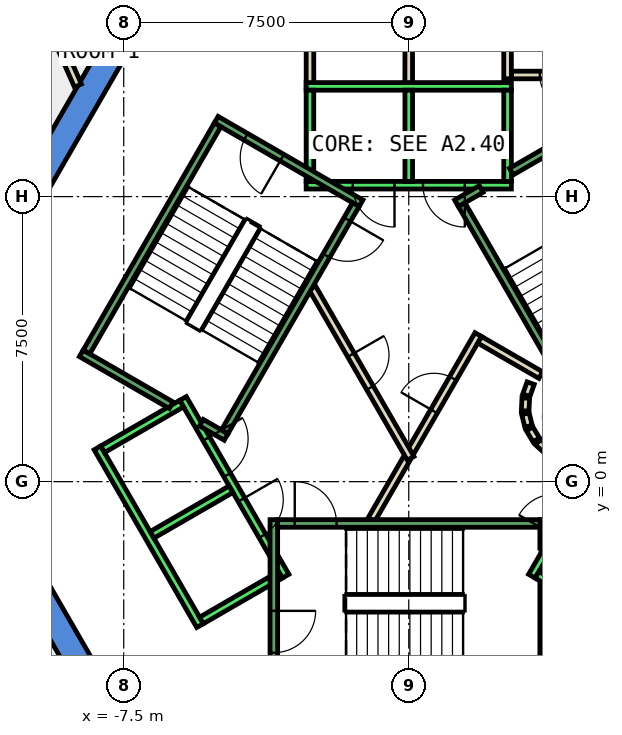
"""IFC4 building model, lengths in metres.
Left out: names, types, materials, properties, quantities, classifications, styles, units other than length and angle.
Written with IfcOpenShell. Run it as: python <this file> out.ifc"""

import sys

from ifc_helpers import new_model, si_unit, direction, frame, frame_2d, origin, place, context, subcontext, project, spatial, polyline, rectangle, outline, extrude, element, fill, save


model = new_model("IFC4")
c1 = context("Model", 3, precision=1e-05, world=origin(), true_north=direction((0.0, 1.0)))
c2 = subcontext(c1, "Body", "Model", "MODEL_VIEW")
j1 = project(units=[si_unit("LENGTHUNIT", "METRE"), si_unit("PLANEANGLEUNIT", "RADIAN")], contexts=[c1])
p1 = place(None, origin())
s1 = spatial("IfcSite", under=j1, at=p1, CompositionType="ELEMENT")
p2 = place(p1, origin())
s2 = spatial("IfcBuilding", under=s1, at=p2, CompositionType="ELEMENT")
p3 = place(p2, frame((0.0, 0.0, 194.0)))
s3 = spatial("IfcBuildingStorey", under=s2, at=p3, CompositionType="ELEMENT", Elevation=194.0)
p4 = place(p3, frame((0.0, 0.0, -0.4)))
e1 = element("IfcWall", 1, at=p4, inside=s3, PredefinedType="SHEAR", context=c2, shape_type="SweptSolid", body=[
    extrude(outline(polyline([(-11.834, 5.002), (-11.228, 4.652), (-6.235, 13.3), (-6.64, 14.0), (-11.834, 5.002)])), origin(), (0.0, 0.0, 1.0), 4.2),
])
p5 = place(p3, frame((0.0, 0.0, -0.4)))
e2 = element("IfcWall", 2, at=p5, inside=s3, PredefinedType="SHEAR", context=c2, shape_type="SweptSolid", body=[
    extrude(outline(polyline([(-13.279, 2.5), (-6.64, -9.0), (-6.235, -8.3), (-12.471, 2.5), (-13.279, 2.5)])), origin(), (0.0, 0.0, 1.0), 4.2),
])
p6 = place(p3, frame((-9.315, 11.801, 0.0), z_axis=(0.0, 0.0, 1.0), x_axis=(0.403943240321, -0.914784050254, 0.0)))
e3 = element("IfcWall", 3, at=p6, inside=s3, PredefinedType="PARTITIONING", context=c2, shape_type="SweptSolid", body=[
    extrude(rectangle(XDim=1.507, YDim=0.2, at=frame_2d((0.754, 0.0))), origin(), (0.0, 0.0, 1.0), 3.8),
])
p7 = place(p3, frame((5.1, 10.7, 0.0), z_axis=(0.0, 0.0, 1.0), x_axis=(-1.0, 0.0, 0.0)))
e4 = element("IfcWall", 4, at=p7, inside=s3, PredefinedType="PARTITIONING", context=c2, shape_type="SweptSolid", body=[
    extrude(rectangle(XDim=2.4, YDim=0.2, at=frame_2d((1.2, 0.0))), origin(), (0.0, 0.0, 1.0), 3.8),
])
p8 = place(p7, frame((0.75, 0.0, 0.0)))
e5 = element("IfcOpeningElement", 5, at=p8, cuts=e4, PredefinedType="OPENING", context=c2, shape_type="SweptSolid", body=[
    extrude(rectangle(XDim=0.9, YDim=2.1, at=frame_2d((0.45, 1.05))), frame((0.0, 0.11, 0.0), z_axis=(0.0, -1.0, 0.0), x_axis=(1.0, 0.0, 0.0)), (0.0, 0.0, 1.0), 0.22),
])
p9 = place(p3, frame((2.6, 10.6, 0.0), z_axis=(0.0, 0.0, 1.0), x_axis=(0.0, 1.0, 0.0)))
e6 = element("IfcWall", 6, at=p9, inside=s3, PredefinedType="PARTITIONING", context=c2, shape_type="SweptSolid", body=[
    extrude(rectangle(XDim=2.7, YDim=0.2, at=frame_2d((1.35, 0.0))), origin(), (0.0, 0.0, 1.0), 3.8),
])
p10 = place(p3, frame((-2.599, 10.399, 0.0), z_axis=(0.0, 0.0, 1.0), x_axis=(-0.000336615314, 0.999999943345, 0.0)))
e7 = element("IfcWall", 7, at=p10, inside=s3, PredefinedType="PARTITIONING", context=c2, shape_type="SweptSolid", body=[
    extrude(rectangle(XDim=2.901, YDim=0.2, at=frame_2d((1.451, 0.0))), origin(), (0.0, 0.0, 1.0), 3.8),
])
p11 = place(p3, frame((0.0, 13.3, 0.0), z_axis=(0.0, 0.0, 1.0), x_axis=(-0.000336728662, -0.999999943307, 0.0)))
e8 = element("IfcWall", 8, at=p11, inside=s3, PredefinedType="PARTITIONING", context=c2, shape_type="SweptSolid", body=[
    extrude(rectangle(XDim=2.9, YDim=0.2, at=frame_2d((1.45, 0.0))), origin(), (0.0, 0.0, 1.0), 3.8),
])
p12 = place(p11, frame((0.85, 0.0, 0.0)))
e9 = element("IfcOpeningElement", 9, at=p12, cuts=e8, PredefinedType="OPENING", context=c2, shape_type="SweptSolid", body=[
    extrude(rectangle(XDim=0.9, YDim=2.1, at=frame_2d((0.45, 1.05))), frame((0.0, 0.11, 0.0), z_axis=(0.0, -1.0, 0.0), x_axis=(1.0, 0.0, 0.0)), (0.0, 0.0, 1.0), 0.22),
])
p13 = place(p3, frame((-0.982, -1.0, 0.0), z_axis=(0.0, 0.0, 1.0), x_axis=(0.50024047865, 0.865886518847, 0.0)))
e10 = element("IfcWall", 10, at=p13, inside=s3, PredefinedType="PARTITIONING", context=c2, shape_type="SweptSolid", body=[
    extrude(rectangle(XDim=1.863, YDim=0.2, at=frame_2d((0.931, 0.0))), origin(), (0.0, 0.0, 1.0), 3.8),
])
p14 = place(p3, frame((0.05, 0.787, 0.0), z_axis=(0.0, 0.0, 1.0), x_axis=(0.499954076797, 0.866051915934, 0.0)))
e11 = element("IfcWall", 11, at=p14, inside=s3, PredefinedType="PARTITIONING", context=c2, shape_type="SweptSolid", body=[
    extrude(rectangle(XDim=3.558, YDim=0.2, at=frame_2d((1.779, 0.0))), origin(), (0.0, 0.0, 1.0), 3.8),
])
p15 = place(p14, frame((1.229, 0.0, 0.0)))
e12 = element("IfcOpeningElement", 12, at=p15, cuts=e11, PredefinedType="OPENING", context=c2, shape_type="SweptSolid", body=[
    extrude(rectangle(XDim=1.0, YDim=2.1, at=frame_2d((0.5, 1.05))), frame((0.0, 0.11, 0.0), z_axis=(0.0, -1.0, 0.0), x_axis=(1.0, 0.0, 0.0)), (0.0, 0.0, 1.0), 0.22),
])
p16 = place(p3, frame((1.866, 3.732, 0.0), z_axis=(0.0, 0.0, 1.0), x_axis=(0.866043361281, -0.499968895414, 0.0)))
e13 = element("IfcWall", 13, at=p16, inside=s3, PredefinedType="PARTITIONING", context=c2, shape_type="SweptSolid", body=[
    extrude(rectangle(XDim=1.858, YDim=0.2, at=frame_2d((0.929, 0.0))), origin(), (0.0, 0.0, 1.0), 3.8),
])
p17 = place(p3, frame((3.208, 2.592, 0.0), z_axis=(0.0, 0.0, 1.0), x_axis=(-0.337388820924, -0.941365382578, 0.0)))
e14 = element("IfcWall", 14, at=p17, inside=s3, PredefinedType="PARTITIONING", context=c2, shape_type="SweptSolid", body=[
    extrude(rectangle(XDim=0.338, YDim=0.2, at=frame_2d((0.169, 0.0))), origin(), (0.0, 0.0, 1.0), 3.8),
])
p18 = place(p3, frame((3.079, 2.199, 0.0), z_axis=(0.0, 0.0, 1.0), x_axis=(-0.047771483479, -0.998858290933, 0.0)))
e15 = element("IfcWall", 15, at=p18, inside=s3, PredefinedType="PARTITIONING", context=c2, shape_type="SweptSolid", body=[
    extrude(rectangle(XDim=0.337, YDim=0.2, at=frame_2d((0.169, 0.0))), origin(), (0.0, 0.0, 1.0), 3.8),
])
p19 = place(p3, frame((3.07, 1.786, 0.0), z_axis=(0.0, 0.0, 1.0), x_axis=(0.242705583207, -0.970099994784, 0.0)))
e16 = element("IfcWall", 16, at=p19, inside=s3, PredefinedType="PARTITIONING", context=c2, shape_type="SweptSolid", body=[
    extrude(rectangle(XDim=0.338, YDim=0.2, at=frame_2d((0.169, 0.0))), origin(), (0.0, 0.0, 1.0), 3.8),
])
for number, where, z_axis, x_axis in (
    (17, (3.182, 1.388, 0.0), (0.0, 0.0, 1.0), (0.512, -0.859, 0.0)),
    (18, (3.404, 1.039, 0.0), (0.0, 0.0, 1.0), (0.74, -0.672, 0.0)),
):
    element("IfcWall", number, at=place(p3, frame(where, z_axis=z_axis, x_axis=x_axis)), inside=s3, PredefinedType="PARTITIONING", context=c2, shape_type="SweptSolid", body=[
        extrude(rectangle(XDim=0.338, YDim=0.2, at=frame_2d((0.169, 0.0))), origin(), (0.0, 0.0, 1.0), 3.8),
    ])
p20 = place(p3, frame((-2.54, 5.1, 0.0), z_axis=(0.0, 0.0, 1.0), x_axis=(0.499925051871, -0.866068670783, 0.0)))
e19 = element("IfcWall", 19, at=p20, inside=s3, PredefinedType="PARTITIONING", context=c2, shape_type="SweptSolid", body=[
    extrude(rectangle(XDim=5.181, YDim=0.2, at=frame_2d((2.59, 0.0))), origin(), (0.0, 0.0, 1.0), 3.8),
])
p21 = place(p20, frame((2.04, 0.0, 0.0)))
e20 = element("IfcOpeningElement", 20, at=p21, cuts=e19, PredefinedType="OPENING", context=c2, shape_type="SweptSolid", body=[
    extrude(rectangle(XDim=1.0, YDim=2.1, at=frame_2d((0.5, 1.05))), frame((0.0, 0.11, 0.0), z_axis=(0.0, -1.0, 0.0), x_axis=(1.0, 0.0, 0.0)), (0.0, 0.0, 1.0), 0.22),
])
p22 = place(p3, frame((2.7, 7.8, 0.0), z_axis=(0.0, 0.0, 1.0), x_axis=(-1.0, 0.0, 0.0)))
e21 = element("IfcWall", 21, at=p22, inside=s3, PredefinedType="STANDARD", context=c2, shape_type="SweptSolid", body=[
    extrude(rectangle(XDim=5.4, YDim=0.2, at=frame_2d((2.7, 0.0))), origin(), (0.0, 0.0, 1.0), 3.8),
])
p23 = place(p22, frame((1.225, 0.0, 0.0)))
e22 = element("IfcOpeningElement", 22, at=p23, cuts=e21, PredefinedType="OPENING", context=c2, shape_type="SweptSolid", body=[
    extrude(rectangle(XDim=1.1, YDim=2.1, at=frame_2d((0.55, 1.05))), frame((0.0, 0.11, 0.0), z_axis=(0.0, -1.0, 0.0), x_axis=(1.0, 0.0, 0.0)), (0.0, 0.0, 1.0), 0.22),
])
p24 = place(p22, frame((3.075, 0.0, 0.0)))
e23 = element("IfcOpeningElement", 23, at=p24, cuts=e21, PredefinedType="OPENING", context=c2, shape_type="SweptSolid", body=[
    extrude(rectangle(XDim=1.1, YDim=2.1, at=frame_2d((0.55, 1.05))), frame((0.0, 0.11, 0.0), z_axis=(0.0, -1.0, 0.0), x_axis=(1.0, 0.0, 0.0)), (0.0, 0.0, 1.0), 0.22),
])
p25 = place(p3, frame((2.7, 10.4, 0.0), z_axis=(0.0, 0.0, 1.0), x_axis=(-1.0, 0.0, 0.0)))
e24 = element("IfcWall", 24, at=p25, inside=s3, PredefinedType="STANDARD", context=c2, shape_type="SweptSolid", body=[
    extrude(rectangle(XDim=5.4, YDim=0.2, at=frame_2d((2.7, 0.0))), origin(), (0.0, 0.0, 1.0), 3.8),
])
for number, where, z_axis, x_axis in (
    (25, (2.6, 7.9, 0.0), (0.0, 0.0, 1.0), (0.0, 1.0, 0.0)),
    (26, (0.0, 7.9, 0.0), (0.0, 0.0, 1.0), (0.0, 1.0, 0.0)),
    (27, (-2.6, 7.9, 0.0), (0.0, 0.0, 1.0), (0.0, 1.0, 0.0)),
):
    element("IfcWall", number, at=place(p3, frame(where, z_axis=z_axis, x_axis=x_axis)), inside=s3, PredefinedType="STANDARD", context=c2, shape_type="SweptSolid", body=[
        extrude(rectangle(XDim=2.4, YDim=0.2, at=frame_2d((1.2, 0.0))), origin(), (0.0, 0.0, 1.0), 3.8),
    ])
p26 = place(p3, frame((-5.94, 2.188, 0.0), z_axis=(0.0, 0.0, 1.0), x_axis=(0.500034260056, -0.866005622828, 0.0)))
e28 = element("IfcWall", 28, at=p26, inside=s3, PredefinedType="STANDARD", context=c2, shape_type="SweptSolid", body=[
    extrude(rectangle(XDim=5.399, YDim=0.2, at=frame_2d((2.7, 0.0))), origin(), (0.0, 0.0, 1.0), 3.8),
])
p27 = place(p26, frame((3.075, 0.0, 0.0)))
e29 = element("IfcOpeningElement", 29, at=p27, cuts=e28, PredefinedType="OPENING", context=c2, shape_type="SweptSolid", body=[
    extrude(rectangle(XDim=1.1, YDim=2.1, at=frame_2d((0.55, 1.05))), frame((0.0, 0.11, 0.0), z_axis=(0.0, -1.0, 0.0), x_axis=(1.0, 0.0, 0.0)), (0.0, 0.0, 1.0), 0.22),
])
p28 = place(p26, frame((1.225, 0.0, 0.0)))
e30 = element("IfcOpeningElement", 30, at=p28, cuts=e28, PredefinedType="OPENING", context=c2, shape_type="SweptSolid", body=[
    extrude(rectangle(XDim=1.1, YDim=2.1, at=frame_2d((0.55, 1.05))), frame((0.0, 0.11, 0.0), z_axis=(0.0, -1.0, 0.0), x_axis=(1.0, 0.0, 0.0)), (0.0, 0.0, 1.0), 0.22),
])
p29 = place(p3, frame((-8.192, 0.888, 0.0), z_axis=(0.0, 0.0, 1.0), x_axis=(0.500034260056, -0.866005622828, 0.0)))
e31 = element("IfcWall", 31, at=p29, inside=s3, PredefinedType="STANDARD", context=c2, shape_type="SweptSolid", body=[
    extrude(rectangle(XDim=5.399, YDim=0.2, at=frame_2d((2.7, 0.0))), origin(), (0.0, 0.0, 1.0), 3.8),
])
for number, where, z_axis, x_axis in (
    (32, (-5.977, 2.052, 0.0), (0.0, 0.0, 1.0), (-0.866, -0.5, 0.0)),
    (33, (-4.677, -0.2, 0.0), (0.0, 0.0, 1.0), (-0.866, -0.5, 0.0)),
):
    element("IfcWall", number, at=place(p3, frame(where, z_axis=z_axis, x_axis=x_axis)), inside=s3, PredefinedType="STANDARD", context=c2, shape_type="SweptSolid", body=[
        extrude(rectangle(XDim=2.399, YDim=0.2, at=frame_2d((1.2, 0.0))), origin(), (0.0, 0.0, 1.0), 3.8),
    ])
p30 = place(p3, frame((-3.377, -2.452, 0.0), z_axis=(0.0, 0.0, 1.0), x_axis=(-0.865955154139, -0.50012165622, 0.0)))
e34 = element("IfcWall", 34, at=p30, inside=s3, PredefinedType="STANDARD", context=c2, shape_type="SweptSolid", body=[
    extrude(rectangle(XDim=2.4, YDim=0.2, at=frame_2d((1.2, 0.0))), origin(), (0.0, 0.0, 1.0), 3.8),
])
p31 = place(p3, frame((3.24, -2.488, 0.0), z_axis=(0.0, 0.0, 1.0), x_axis=(0.500034260056, 0.866005622828, 0.0)))
e35 = element("IfcWall", 35, at=p31, inside=s3, PredefinedType="STANDARD", context=c2, shape_type="SweptSolid", body=[
    extrude(rectangle(XDim=5.399, YDim=0.2, at=frame_2d((2.7, 0.0))), origin(), (0.0, 0.0, 1.0), 3.8),
])
p32 = place(p31, frame((3.225, 0.0, 0.0)))
e36 = element("IfcOpeningElement", 36, at=p32, cuts=e35, PredefinedType="OPENING", context=c2, shape_type="SweptSolid", body=[
    extrude(rectangle(XDim=1.1, YDim=2.1, at=frame_2d((0.55, 1.05))), frame((0.0, 0.11, 0.0), z_axis=(0.0, -1.0, 0.0), x_axis=(1.0, 0.0, 0.0)), (0.0, 0.0, 1.0), 0.22),
])
p33 = place(p31, frame((1.225, 0.0, 0.0)))
e37 = element("IfcOpeningElement", 37, at=p33, cuts=e35, PredefinedType="OPENING", context=c2, shape_type="SweptSolid", body=[
    extrude(rectangle(XDim=1.1, YDim=2.1, at=frame_2d((0.55, 1.05))), frame((0.0, 0.11, 0.0), z_axis=(0.0, -1.0, 0.0), x_axis=(1.0, 0.0, 0.0)), (0.0, 0.0, 1.0), 0.22),
])
p34 = place(p3, frame((3.377, -2.452, 0.0), z_axis=(0.0, 0.0, 1.0), x_axis=(0.865955154139, -0.50012165622, 0.0)))
e38 = element("IfcWall", 38, at=p34, inside=s3, PredefinedType="STANDARD", context=c2, shape_type="SweptSolid", body=[
    extrude(rectangle(XDim=2.4, YDim=0.2, at=frame_2d((1.2, 0.0))), origin(), (0.0, 0.0, 1.0), 3.8),
])
p35 = place(p3, frame((-3.55, -1.0, 0.0), z_axis=(0.0, 0.0, 1.0), x_axis=(0.0, -1.0, 0.0)))
e39 = element("IfcWall", 39, at=p35, inside=s3, PredefinedType="STANDARD", context=c2, shape_type="SweptSolid", body=[
    extrude(rectangle(XDim=4.4, YDim=0.2, at=frame_2d((2.2, 0.0))), origin(), (0.0, 0.0, 1.0), 3.8),
])
p36 = place(p35, frame((2.4, 0.0, 0.0)))
e40 = element("IfcOpeningElement", 40, at=p36, cuts=e39, PredefinedType="OPENING", context=c2, shape_type="SweptSolid", body=[
    extrude(rectangle(XDim=1.1, YDim=2.2, at=frame_2d((0.55, 1.1))), frame((0.0, 0.11, 0.0), z_axis=(0.0, -1.0, 0.0), x_axis=(1.0, 0.0, 0.0)), (0.0, 0.0, 1.0), 0.22),
])
p37 = place(p3, frame((3.55, -2.667, 0.0), z_axis=(0.0, 0.0, 1.0), x_axis=(0.0, -1.0, 0.0)))
e41 = element("IfcWall", 41, at=p37, inside=s3, PredefinedType="STANDARD", context=c2, shape_type="SweptSolid", body=[
    extrude(rectangle(XDim=2.733, YDim=0.2, at=frame_2d((1.366, 0.0))), origin(), (0.0, 0.0, 1.0), 3.8),
])
p38 = place(p3, frame((3.55, -1.0, 0.0), z_axis=(0.0, 0.0, 1.0), x_axis=(0.0, -1.0, 0.0)))
e42 = element("IfcWall", 42, at=p38, inside=s3, PredefinedType="STANDARD", context=c2, shape_type="SweptSolid", body=[
    extrude(rectangle(XDim=0.751, YDim=0.2, at=frame_2d((0.375, 0.0))), origin(), (0.0, 0.0, 1.0), 3.8),
])
p39 = place(p3, frame((-3.45, -1.1, 0.0), z_axis=(0.0, 0.0, 1.0), x_axis=(1.0, 0.0, 0.0)))
e43 = element("IfcWall", 43, at=p39, inside=s3, PredefinedType="STANDARD", context=c2, shape_type="SweptSolid", body=[
    extrude(rectangle(XDim=6.9, YDim=0.2, at=frame_2d((3.45, 0.0))), origin(), (0.0, 0.0, 1.0), 3.8),
])
p40 = place(p39, frame((0.45, 0.0, 0.0)))
e44 = element("IfcOpeningElement", 44, at=p40, cuts=e43, PredefinedType="OPENING", context=c2, shape_type="SweptSolid", body=[
    extrude(rectangle(XDim=1.1, YDim=2.2, at=frame_2d((0.55, 1.1))), frame((0.0, 0.11, 0.0), z_axis=(0.0, -1.0, 0.0), x_axis=(1.0, 0.0, 0.0)), (0.0, 0.0, 1.0), 0.22),
])
p41 = place(p3, frame((2.7, 8.158, 0.0), z_axis=(0.0, 0.0, 1.0), x_axis=(0.86611865017, 0.499838457731, 0.0)))
e45 = element("IfcWall", 45, at=p41, inside=s3, PredefinedType="STANDARD", context=c2, shape_type="SweptSolid", body=[
    extrude(rectangle(XDim=2.733, YDim=0.2, at=frame_2d((1.366, 0.0))), origin(), (0.0, 0.0, 1.0), 3.8),
])
p42 = place(p3, frame((1.256, 7.324, 0.0), z_axis=(0.0, 0.0, 1.0), x_axis=(0.865915093549, 0.500191014278, 0.0)))
e46 = element("IfcWall", 46, at=p42, inside=s3, PredefinedType="STANDARD", context=c2, shape_type="SweptSolid", body=[
    extrude(rectangle(XDim=0.752, YDim=0.2, at=frame_2d((0.376, 0.0))), origin(), (0.0, 0.0, 1.0), 3.8),
])
p43 = place(p3, frame((4.843, 1.312, 0.0), z_axis=(0.0, 0.0, 1.0), x_axis=(-0.499963383562, 0.866046543262, 0.0)))
e47 = element("IfcWall", 47, at=p43, inside=s3, PredefinedType="STANDARD", context=c2, shape_type="SweptSolid", body=[
    extrude(rectangle(XDim=6.9, YDim=0.2, at=frame_2d((3.45, 0.0))), origin(), (0.0, 0.0, 1.0), 3.8),
])
p44 = place(p43, frame((0.45, 0.0, 0.0)))
e48 = element("IfcOpeningElement", 48, at=p44, cuts=e47, PredefinedType="OPENING", context=c2, shape_type="SweptSolid", body=[
    extrude(rectangle(XDim=1.1, YDim=2.2, at=frame_2d((0.55, 1.1))), frame((0.0, 0.11, 0.0), z_axis=(0.0, -1.0, 0.0), x_axis=(1.0, 0.0, 0.0)), (0.0, 0.0, 1.0), 0.22),
])
p45 = place(p3, frame((-1.256, 7.324, 0.0), z_axis=(0.0, 0.0, 1.0), x_axis=(-0.866046073146, 0.499964197906, 0.0)))
e49 = element("IfcWall", 49, at=p45, inside=s3, PredefinedType="STANDARD", context=c2, shape_type="SweptSolid", body=[
    extrude(rectangle(XDim=4.4, YDim=0.2, at=frame_2d((2.2, 0.0))), origin(), (0.0, 0.0, 1.0), 3.8),
])
p46 = place(p45, frame((2.4, 0.0, 0.0)))
e50 = element("IfcOpeningElement", 50, at=p46, cuts=e49, PredefinedType="OPENING", context=c2, shape_type="SweptSolid", body=[
    extrude(rectangle(XDim=1.1, YDim=2.2, at=frame_2d((0.55, 1.1))), frame((0.0, 0.11, 0.0), z_axis=(0.0, -1.0, 0.0), x_axis=(1.0, 0.0, 0.0)), (0.0, 0.0, 1.0), 0.22),
])
p47 = place(p3, frame((-6.25, 2.01, 0.0), z_axis=(0.0, 0.0, 1.0), x_axis=(-0.86611865017, 0.499838457731, 0.0)))
e51 = element("IfcWall", 51, at=p47, inside=s3, PredefinedType="STANDARD", context=c2, shape_type="SweptSolid", body=[
    extrude(rectangle(XDim=2.733, YDim=0.2, at=frame_2d((1.366, 0.0))), origin(), (0.0, 0.0, 1.0), 3.8),
])
p48 = place(p3, frame((-4.806, 1.176, 0.0), z_axis=(0.0, 0.0, 1.0), x_axis=(-0.866558586415, 0.499075361355, 0.0)))
e52 = element("IfcWall", 52, at=p48, inside=s3, PredefinedType="STANDARD", context=c2, shape_type="SweptSolid", body=[
    extrude(rectangle(XDim=0.751, YDim=0.2, at=frame_2d((0.376, 0.0))), origin(), (0.0, 0.0, 1.0), 3.8),
])
p49 = place(p3, frame((-1.393, 7.288, 0.0), z_axis=(0.0, 0.0, 1.0), x_axis=(-0.499963383562, -0.866046543262, 0.0)))
e53 = element("IfcWall", 53, at=p49, inside=s3, PredefinedType="STANDARD", context=c2, shape_type="SweptSolid", body=[
    extrude(rectangle(XDim=6.9, YDim=0.2, at=frame_2d((3.45, 0.0))), origin(), (0.0, 0.0, 1.0), 3.8),
])
p50 = place(p49, frame((0.45, 0.0, 0.0)))
e54 = element("IfcOpeningElement", 54, at=p50, cuts=e53, PredefinedType="OPENING", context=c2, shape_type="SweptSolid", body=[
    extrude(rectangle(XDim=1.1, YDim=2.2, at=frame_2d((0.55, 1.1))), frame((0.0, 0.11, 0.0), z_axis=(0.0, -1.0, 0.0), x_axis=(1.0, 0.0, 0.0)), (0.0, 0.0, 1.0), 0.22),
])
p51 = place(p3, frame((-5.03, 9.388, 0.0), z_axis=(0.0, 0.0, 1.0), x_axis=(-0.499978703459, -0.866037698999, 0.0)))
e55 = element("IfcWall", 55, at=p51, inside=s3, PredefinedType="STANDARD", context=c2, shape_type="SweptSolid", body=[
    extrude(rectangle(XDim=6.9, YDim=0.2, at=frame_2d((3.45, 0.0))), origin(), (0.0, 0.0, 1.0), 3.8),
])
p52 = place(p15, origin())
e56 = element("IfcDoor", 56, at=p52, inside=s3, OperationType="SINGLE_SWING_RIGHT", PredefinedType="DOOR", context=c2, shape_type="SweptSolid", body=[
    extrude(rectangle(XDim=1.0, YDim=2.1, at=frame_2d((0.5, 1.05))), frame((0.0, 0.025, 0.0), z_axis=(0.0, -1.0, 0.0), x_axis=(1.0, 0.0, 0.0)), (0.0, 0.0, 1.0), 0.05),
])
fill(e12, e56)
p53 = place(p21, origin())
e57 = element("IfcDoor", 57, at=p53, inside=s3, OperationType="SINGLE_SWING_RIGHT", PredefinedType="DOOR", context=c2, shape_type="SweptSolid", body=[
    extrude(rectangle(XDim=1.0, YDim=2.1, at=frame_2d((0.5, 1.05))), frame((0.0, 0.025, 0.0), z_axis=(0.0, -1.0, 0.0), x_axis=(1.0, 0.0, 0.0)), (0.0, 0.0, 1.0), 0.05),
])
fill(e20, e57)
p54 = place(p8, origin())
e58 = element("IfcDoor", 58, at=p54, inside=s3, OperationType="SINGLE_SWING_RIGHT", PredefinedType="DOOR", context=c2, shape_type="SweptSolid", body=[
    extrude(rectangle(XDim=0.9, YDim=2.1, at=frame_2d((0.45, 1.05))), frame((0.0, 0.025, 0.0), z_axis=(0.0, -1.0, 0.0), x_axis=(1.0, 0.0, 0.0)), (0.0, 0.0, 1.0), 0.05),
])
fill(e5, e58)
p55 = place(p23, origin())
e59 = element("IfcDoor", 59, at=p55, inside=s3, OperationType="SLIDING_TO_LEFT", PredefinedType="DOOR", context=c2, shape_type="SweptSolid", body=[
    extrude(rectangle(XDim=1.1, YDim=2.1, at=frame_2d((0.55, 1.05))), frame((0.0, 0.025, 0.0), z_axis=(0.0, -1.0, 0.0), x_axis=(1.0, 0.0, 0.0)), (0.0, 0.0, 1.0), 0.05),
])
fill(e22, e59)
p56 = place(p24, origin())
e60 = element("IfcDoor", 60, at=p56, inside=s3, OperationType="SLIDING_TO_LEFT", PredefinedType="DOOR", context=c2, shape_type="SweptSolid", body=[
    extrude(rectangle(XDim=1.1, YDim=2.1, at=frame_2d((0.55, 1.05))), frame((0.0, 0.025, 0.0), z_axis=(0.0, -1.0, 0.0), x_axis=(1.0, 0.0, 0.0)), (0.0, 0.0, 1.0), 0.05),
])
fill(e23, e60)
p57 = place(p27, origin())
e61 = element("IfcDoor", 61, at=p57, inside=s3, OperationType="SLIDING_TO_LEFT", PredefinedType="DOOR", context=c2, shape_type="SweptSolid", body=[
    extrude(rectangle(XDim=1.1, YDim=2.1, at=frame_2d((0.55, 1.05))), frame((0.0, 0.025, 0.0), z_axis=(0.0, -1.0, 0.0), x_axis=(1.0, 0.0, 0.0)), (0.0, 0.0, 1.0), 0.05),
])
fill(e29, e61)
p58 = place(p28, origin())
e62 = element("IfcDoor", 62, at=p58, inside=s3, OperationType="SLIDING_TO_LEFT", PredefinedType="DOOR", context=c2, shape_type="SweptSolid", body=[
    extrude(rectangle(XDim=1.1, YDim=2.1, at=frame_2d((0.55, 1.05))), frame((0.0, 0.025, 0.0), z_axis=(0.0, -1.0, 0.0), x_axis=(1.0, 0.0, 0.0)), (0.0, 0.0, 1.0), 0.05),
])
fill(e30, e62)
p59 = place(p40, origin())
e63 = element("IfcDoor", 63, at=p59, inside=s3, OperationType="SINGLE_SWING_LEFT", PredefinedType="DOOR", context=c2, shape_type="SweptSolid", body=[
    extrude(rectangle(XDim=1.1, YDim=2.2, at=frame_2d((0.55, 1.1))), frame((0.0, 0.025, 0.0), z_axis=(0.0, -1.0, 0.0), x_axis=(1.0, 0.0, 0.0)), (0.0, 0.0, 1.0), 0.05),
])
fill(e44, e63)
p60 = place(p36, origin())
e64 = element("IfcDoor", 64, at=p60, inside=s3, OperationType="SINGLE_SWING_LEFT", PredefinedType="DOOR", context=c2, shape_type="SweptSolid", body=[
    extrude(rectangle(XDim=1.1, YDim=2.2, at=frame_2d((0.55, 1.1))), frame((0.0, 0.025, 0.0), z_axis=(0.0, -1.0, 0.0), x_axis=(1.0, 0.0, 0.0)), (0.0, 0.0, 1.0), 0.05),
])
fill(e40, e64)
p61 = place(p50, origin())
e65 = element("IfcDoor", 65, at=p61, inside=s3, OperationType="SINGLE_SWING_LEFT", PredefinedType="DOOR", context=c2, shape_type="SweptSolid", body=[
    extrude(rectangle(XDim=1.1, YDim=2.2, at=frame_2d((0.55, 1.1))), frame((0.0, 0.025, 0.0), z_axis=(0.0, -1.0, 0.0), x_axis=(1.0, 0.0, 0.0)), (0.0, 0.0, 1.0), 0.05),
])
fill(e54, e65)
p62 = place(p46, origin())
e66 = element("IfcDoor", 66, at=p62, inside=s3, OperationType="SINGLE_SWING_LEFT", PredefinedType="DOOR", context=c2, shape_type="SweptSolid", body=[
    extrude(rectangle(XDim=1.1, YDim=2.2, at=frame_2d((0.55, 1.1))), frame((0.0, 0.025, 0.0), z_axis=(0.0, -1.0, 0.0), x_axis=(1.0, 0.0, 0.0)), (0.0, 0.0, 1.0), 0.05),
])
fill(e50, e66)
save(model, sys.argv[1])
